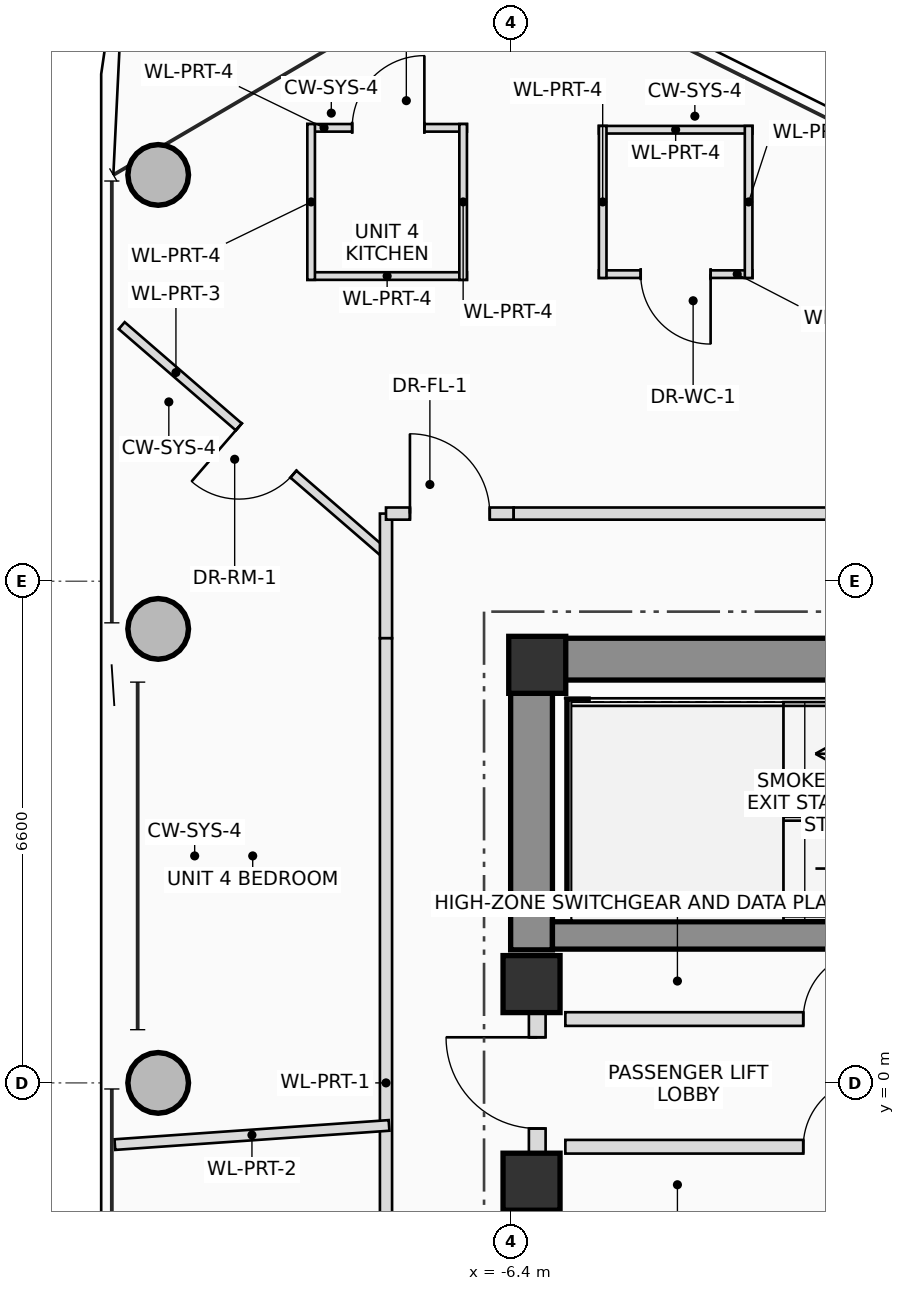
"""IFC4 building model, lengths in metres.
Left out: names, types, materials, properties, quantities, classifications, styles, units other than length and angle.
Written with IfcOpenShell. Run it as: python <this file> out.ifc"""

import sys

from ifc_helpers import new_model, si_unit, direction, frame, frame_2d, origin, origin_2d, place, context, subcontext, project, spatial, rectangle, hollow_circle, extrude, source, transform, mapped, element, fill, save


model = new_model("IFC4")
c1 = context("Model", 3, precision=1e-05, world=origin(), true_north=direction((0.0, 1.0)))
c2 = subcontext(c1, "Body", "Model", "MODEL_VIEW")
j1 = project(units=[si_unit("LENGTHUNIT", "METRE"), si_unit("PLANEANGLEUNIT", "RADIAN")], contexts=[c1])
p1 = place(None, origin())
s1 = spatial("IfcSite", under=j1, at=p1, CompositionType="ELEMENT")
p2 = place(p1, origin())
s2 = spatial("IfcBuilding", under=s1, at=p2, CompositionType="ELEMENT")
p3 = place(p2, frame((0.0, 0.0, 303.65)))
s3 = spatial("IfcBuildingStorey", under=s2, at=p3, CompositionType="ELEMENT", Elevation=303.65)
m1 = source(origin(), c2, "Body", "SweptSolid", [
    extrude(rectangle(XDim=0.75, YDim=0.75, at=origin_2d()), origin(), (0.0, 0.0, 1.0), 3.45),
])
p4 = place(p3, frame((-6.05, 5.5, 0.0), z_axis=(0.0, 0.0, 1.0), x_axis=(1.0, 0.0, 0.0)))
e1 = element("IfcColumn", 1, at=p4, inside=s3, PredefinedType="COLUMN", context=c2, shape_type="MappedRepresentation", body=[
    mapped(m1, transform((0.0, 0.0, 0.0), scale=1.0)),
])
p5 = place(p3, frame((-6.4, 5.575, 0.0), z_axis=(0.0, 0.0, 1.0), x_axis=(1.0, 0.0, 0.0)))
e2 = element("IfcWall", 2, at=p5, inside=s3, PredefinedType="SHEAR", context=c2, shape_type="SweptSolid", body=[
    extrude(rectangle(XDim=12.8, YDim=0.55, at=frame_2d((6.4, 0.0))), origin(), (0.0, 0.0, 1.0), 3.45),
])
p6 = place(p5, frame((8.6, 0.0, 0.0)))
e3 = element("IfcOpeningElement", 3, at=p6, cuts=e2, PredefinedType="OPENING", context=c2, shape_type="SweptSolid", body=[
    extrude(rectangle(XDim=1.2, YDim=2.2, at=frame_2d((0.6, 1.1))), frame((0.0, 0.285, 0.0), z_axis=(0.0, -1.0, 0.0), x_axis=(1.0, 0.0, 0.0)), (0.0, 0.0, 1.0), 0.57),
])
p7 = place(p3, frame((-6.125, 1.75, 0.0), z_axis=(0.0, 0.0, 1.0), x_axis=(0.0, 1.0, 0.0)))
e4 = element("IfcWall", 4, at=p7, inside=s3, PredefinedType="SHEAR", context=c2, shape_type="SweptSolid", body=[
    extrude(rectangle(XDim=3.55, YDim=0.55, at=frame_2d((1.775, 0.0))), origin(), (0.0, 0.0, 1.0), 3.45),
])
p8 = place(p3, frame((-5.85, 1.94, 0.0), z_axis=(0.0, 0.0, 1.0), x_axis=(1.0, 0.0, 0.0)))
e5 = element("IfcWall", 5, at=p8, inside=s3, PredefinedType="SHEAR", context=c2, shape_type="SweptSolid", body=[
    extrude(rectangle(XDim=11.7, YDim=0.36, at=frame_2d((5.85, 0.0))), origin(), (0.0, 0.0, 1.0), 3.45),
])
p9 = place(p3, frame((-5.52, 2.3, 0.0), z_axis=(0.0, 0.0, 1.0), x_axis=(0.0, 1.0, 0.0)))
e6 = element("IfcWall", 6, at=p9, inside=s3, PredefinedType="SHEAR", context=c2, shape_type="SweptSolid", body=[
    extrude(rectangle(XDim=2.75, YDim=0.28, at=frame_2d((1.375, 0.0))), origin(), (0.0, 0.0, 1.0), 3.45),
])
for number, where, z_axis, x_axis in (
    (7, (-6.125, -1.3, 0.0), (0.0, 0.0, 1.0), (1.0, 0.0, 0.0)),
    (8, (-6.125, 1.3, 0.0), (0.0, 0.0, 1.0), (1.0, 0.0, 0.0)),
):
    element("IfcColumn", number, at=place(p3, frame(where, z_axis=z_axis, x_axis=x_axis)), inside=s3, PredefinedType="COLUMN", context=c2, shape_type="MappedRepresentation", body=[
        mapped(m1, transform((0.0, 0.0, 0.0), scale=1.0)),
    ])
m2 = source(origin(), c2, "Body", "SweptSolid", [
    extrude(hollow_circle(Radius=0.4, WallThickness=0.028, at=origin_2d()), origin(), (0.0, 0.0, 1.0), 3.45),
])
for number, where, z_axis, x_axis in (
    (9, (-11.037, 11.945, 0.0), (0.0, 0.0, 1.0), (1.0, 0.0, 0.0)),
    (10, (-11.037, 5.973, 0.0), (0.0, 0.0, 1.0), (1.0, 0.0, 0.0)),
    (11, (-11.037, 0.0, 0.0), (0.0, 0.0, 1.0), (1.0, 0.0, 0.0)),
):
    element("IfcColumn", number, at=place(p3, frame(where, z_axis=z_axis, x_axis=x_axis)), inside=s3, PredefinedType="COLUMN", context=c2, shape_type="MappedRepresentation", body=[
        mapped(m2, transform((0.0, 0.0, 0.0), scale=1.0)),
    ])
p10 = place(p3, frame((-6.05, -0.95, 0.0), z_axis=(0.0, 0.0, 1.0), x_axis=(0.0, 1.0, 0.0)))
e12 = element("IfcWall", 12, at=p10, inside=s3, PredefinedType="PLUMBINGWALL", context=c2, shape_type="SweptSolid", body=[
    extrude(rectangle(XDim=1.9, YDim=0.22, at=frame_2d((0.95, 0.0))), origin(), (0.0, 0.0, 1.0), 2.23),
])
p11 = place(p10, frame((0.35, 0.0, 0.0)))
e13 = element("IfcOpeningElement", 13, at=p11, cuts=e12, PredefinedType="OPENING", context=c2, shape_type="SweptSolid", body=[
    extrude(rectangle(XDim=1.2, YDim=2.2, at=frame_2d((0.6, 1.1))), frame((0.0, 0.12, 0.0), z_axis=(0.0, -1.0, 0.0), x_axis=(1.0, 0.0, 0.0)), (0.0, 0.0, 1.0), 0.24),
])
p12 = place(p3, frame((-5.68, 0.84, 0.0), z_axis=(0.0, 0.0, 1.0), x_axis=(1.0, 0.0, 0.0)))
e14 = element("IfcWall", 14, at=p12, inside=s3, PredefinedType="PLUMBINGWALL", context=c2, shape_type="SweptSolid", body=[
    extrude(rectangle(XDim=11.33, YDim=0.18, at=frame_2d((5.665, 0.0))), origin(), (0.0, 0.0, 1.0), 3.25),
])
p13 = place(p12, frame((3.13, 0.0, 0.0)))
e15 = element("IfcOpeningElement", 15, at=p13, cuts=e14, PredefinedType="OPENING", context=c2, shape_type="SweptSolid", body=[
    extrude(rectangle(XDim=0.9, YDim=2.05, at=frame_2d((0.45, 1.025))), frame((0.0, 0.1, 0.0), z_axis=(0.0, -1.0, 0.0), x_axis=(1.0, 0.0, 0.0)), (0.0, 0.0, 1.0), 0.2),
])
p14 = place(p12, frame((7.33, 0.0, 0.0)))
e16 = element("IfcOpeningElement", 16, at=p14, cuts=e14, PredefinedType="OPENING", context=c2, shape_type="SweptSolid", body=[
    extrude(rectangle(XDim=1.1, YDim=2.2, at=frame_2d((0.55, 1.1))), frame((0.0, 0.1, 0.0), z_axis=(0.0, -1.0, 0.0), x_axis=(1.0, 0.0, 0.0)), (0.0, 0.0, 1.0), 0.2),
])
p15 = place(p12, frame((8.83, 0.0, 0.0)))
e17 = element("IfcOpeningElement", 17, at=p15, cuts=e14, PredefinedType="OPENING", context=c2, shape_type="SweptSolid", body=[
    extrude(rectangle(XDim=1.1, YDim=2.2, at=frame_2d((0.55, 1.1))), frame((0.0, 0.1, 0.0), z_axis=(0.0, -1.0, 0.0), x_axis=(1.0, 0.0, 0.0)), (0.0, 0.0, 1.0), 0.2),
])
p16 = place(p12, frame((10.25, 0.0, 0.0)))
e18 = element("IfcOpeningElement", 18, at=p16, cuts=e14, PredefinedType="OPENING", context=c2, shape_type="SweptSolid", body=[
    extrude(rectangle(XDim=0.9, YDim=2.05, at=frame_2d((0.45, 1.025))), frame((0.0, 0.1, 0.0), z_axis=(0.0, -1.0, 0.0), x_axis=(1.0, 0.0, 0.0)), (0.0, 0.0, 1.0), 0.2),
])
p17 = place(p3, frame((-5.68, -0.84, 0.0), z_axis=(0.0, 0.0, 1.0), x_axis=(1.0, 0.0, 0.0)))
e19 = element("IfcWall", 19, at=p17, inside=s3, PredefinedType="PLUMBINGWALL", context=c2, shape_type="SweptSolid", body=[
    extrude(rectangle(XDim=11.33, YDim=0.18, at=frame_2d((5.665, 0.0))), origin(), (0.0, 0.0, 1.0), 3.25),
])
p18 = place(p17, frame((3.13, 0.0, 0.0)))
e20 = element("IfcOpeningElement", 20, at=p18, cuts=e19, PredefinedType="OPENING", context=c2, shape_type="SweptSolid", body=[
    extrude(rectangle(XDim=0.9, YDim=2.05, at=frame_2d((0.45, 1.025))), frame((0.0, 0.1, 0.0), z_axis=(0.0, -1.0, 0.0), x_axis=(1.0, 0.0, 0.0)), (0.0, 0.0, 1.0), 0.2),
])
p19 = place(p17, frame((7.33, 0.0, 0.0)))
e21 = element("IfcOpeningElement", 21, at=p19, cuts=e19, PredefinedType="OPENING", context=c2, shape_type="SweptSolid", body=[
    extrude(rectangle(XDim=1.1, YDim=2.2, at=frame_2d((0.55, 1.1))), frame((0.0, 0.1, 0.0), z_axis=(0.0, -1.0, 0.0), x_axis=(1.0, 0.0, 0.0)), (0.0, 0.0, 1.0), 0.2),
])
p20 = place(p17, frame((9.58, 0.0, 0.0)))
e22 = element("IfcOpeningElement", 22, at=p20, cuts=e19, PredefinedType="OPENING", context=c2, shape_type="SweptSolid", body=[
    extrude(rectangle(XDim=0.9, YDim=2.05, at=frame_2d((0.45, 1.025))), frame((0.0, 0.1, 0.0), z_axis=(0.0, -1.0, 0.0), x_axis=(1.0, 0.0, 0.0)), (0.0, 0.0, 1.0), 0.2),
])
p21 = place(p3, frame((-8.07, 6.981, 0.0), z_axis=(0.0, 0.0, 1.0), x_axis=(-0.756280799409, 0.654247164644, 0.0)))
e23 = element("IfcWall", 23, at=p21, inside=s3, PredefinedType="PARTITIONING", context=c2, shape_type="SweptSolid", body=[
    extrude(rectangle(XDim=4.558, YDim=0.12, at=frame_2d((2.279, 0.0))), origin(), (0.0, 0.0, 1.0), 2.815),
])
p22 = place(p21, frame((1.571, 0.0, 0.0)))
e24 = element("IfcOpeningElement", 24, at=p22, cuts=e23, PredefinedType="OPENING", context=c2, shape_type="SweptSolid", body=[
    extrude(rectangle(XDim=0.95, YDim=2.1, at=frame_2d((0.475, 1.05))), frame((0.0, 0.07, 0.0), z_axis=(0.0, -1.0, 0.0), x_axis=(1.0, 0.0, 0.0)), (0.0, 0.0, 1.0), 0.14),
])
p23 = place(p3, frame((-5.239, 12.54, 0.0), z_axis=(0.0, 0.0, 1.0), x_axis=(1.0, 0.0, 0.0)))
e25 = element("IfcWall", 25, at=p23, inside=s3, PredefinedType="PARTITIONING", context=c2, shape_type="SweptSolid", body=[
    extrude(rectangle(XDim=2.02, YDim=0.1, at=frame_2d((1.01, 0.0))), origin(), (0.0, 0.0, 1.0), 2.815),
])
p24 = place(p3, frame((-3.219, 10.64, 0.0), z_axis=(0.0, 0.0, 1.0), x_axis=(-1.0, 0.0, 0.0)))
e26 = element("IfcWall", 26, at=p24, inside=s3, PredefinedType="PARTITIONING", context=c2, shape_type="SweptSolid", body=[
    extrude(rectangle(XDim=2.02, YDim=0.1, at=frame_2d((1.01, 0.0))), origin(), (0.0, 0.0, 1.0), 2.905),
])
p25 = place(p24, frame((0.55, 0.0, 0.0)))
e27 = element("IfcOpeningElement", 27, at=p25, cuts=e26, PredefinedType="OPENING", context=c2, shape_type="SweptSolid", body=[
    extrude(rectangle(XDim=0.92, YDim=2.1, at=frame_2d((0.46, 1.05))), frame((0.0, 0.06, 0.0), z_axis=(0.0, -1.0, 0.0), x_axis=(1.0, 0.0, 0.0)), (0.0, 0.0, 1.0), 0.12),
])
p26 = place(p3, frame((-3.269, 12.59, 0.0), z_axis=(0.0, 0.0, 1.0), x_axis=(0.0, -1.0, 0.0)))
e28 = element("IfcWall", 28, at=p26, inside=s3, PredefinedType="PARTITIONING", context=c2, shape_type="SweptSolid", body=[
    extrude(rectangle(XDim=2.0, YDim=0.1, at=frame_2d((1.0, 0.0))), origin(), (0.0, 0.0, 1.0), 2.815),
])
p27 = place(p3, frame((-5.189, 10.59, 0.0), z_axis=(0.0, 0.0, 1.0), x_axis=(0.0, 1.0, 0.0)))
e29 = element("IfcWall", 29, at=p27, inside=s3, PredefinedType="PARTITIONING", context=c2, shape_type="SweptSolid", body=[
    extrude(rectangle(XDim=2.0, YDim=0.1, at=frame_2d((1.0, 0.0))), origin(), (0.0, 0.0, 1.0), 2.905),
])
p28 = place(p3, frame((-9.075, 12.565, 0.0), z_axis=(0.0, 0.0, 1.0), x_axis=(1.0, 0.0, 0.0)))
e30 = element("IfcWall", 30, at=p28, inside=s3, PredefinedType="PARTITIONING", context=c2, shape_type="SweptSolid", body=[
    extrude(rectangle(XDim=2.1, YDim=0.1, at=frame_2d((1.05, 0.0))), origin(), (0.0, 0.0, 1.0), 3.25),
])
p29 = place(p28, frame((0.59, 0.0, 0.0)))
e31 = element("IfcOpeningElement", 31, at=p29, cuts=e30, PredefinedType="OPENING", context=c2, shape_type="SweptSolid", body=[
    extrude(rectangle(XDim=0.95, YDim=2.1, at=frame_2d((0.475, 1.05))), frame((0.0, 0.06, 0.0), z_axis=(0.0, -1.0, 0.0), x_axis=(1.0, 0.0, 0.0)), (0.0, 0.0, 1.0), 0.12),
])
p30 = place(p3, frame((-6.975, 10.615, 0.0), z_axis=(0.0, 0.0, 1.0), x_axis=(-1.0, 0.0, 0.0)))
e32 = element("IfcWall", 32, at=p30, inside=s3, PredefinedType="PARTITIONING", context=c2, shape_type="SweptSolid", body=[
    extrude(rectangle(XDim=2.1, YDim=0.1, at=frame_2d((1.05, 0.0))), origin(), (0.0, 0.0, 1.0), 2.905),
])
p31 = place(p3, frame((-7.025, 12.615, 0.0), z_axis=(0.0, 0.0, 1.0), x_axis=(0.0, -1.0, 0.0)))
e33 = element("IfcWall", 33, at=p31, inside=s3, PredefinedType="PARTITIONING", context=c2, shape_type="SweptSolid", body=[
    extrude(rectangle(XDim=2.05, YDim=0.1, at=frame_2d((1.025, 0.0))), origin(), (0.0, 0.0, 1.0), 2.905),
])
p32 = place(p3, frame((-9.025, 10.565, 0.0), z_axis=(0.0, 0.0, 1.0), x_axis=(0.0, 1.0, 0.0)))
e34 = element("IfcWall", 34, at=p32, inside=s3, PredefinedType="PARTITIONING", context=c2, shape_type="SweptSolid", body=[
    extrude(rectangle(XDim=2.05, YDim=0.1, at=frame_2d((1.025, 0.0))), origin(), (0.0, 0.0, 1.0), 3.25),
])
p33 = place(p3, frame((-8.04, 5.85, 0.0), z_axis=(0.0, 0.0, 1.0), x_axis=(0.0, 1.0, 0.0)))
e35 = element("IfcWall", 35, at=p33, inside=s3, PredefinedType="PARTITIONING", context=c2, shape_type="SweptSolid", body=[
    extrude(rectangle(XDim=1.64, YDim=0.16, at=frame_2d((0.82, 0.0))), origin(), (0.0, 0.0, 1.0), 2.905),
])
p34 = place(p3, frame((-8.04, 7.49, 0.0), z_axis=(0.0, 0.0, 1.0), x_axis=(1.0, 0.0, 0.0)))
e36 = element("IfcWall", 36, at=p34, inside=s3, PredefinedType="PARTITIONING", context=c2, shape_type="SweptSolid", body=[
    extrude(rectangle(XDim=1.68, YDim=0.16, at=frame_2d((0.84, 0.0))), origin(), (0.0, 0.0, 1.0), 2.655),
])
p35 = place(p34, frame((0.315, 0.0, 0.0)))
e37 = element("IfcOpeningElement", 37, at=p35, cuts=e36, PredefinedType="OPENING", context=c2, shape_type="SweptSolid", body=[
    extrude(rectangle(XDim=1.05, YDim=2.2, at=frame_2d((0.525, 1.1))), frame((0.0, 0.09, 0.0), z_axis=(0.0, -1.0, 0.0), x_axis=(1.0, 0.0, 0.0)), (0.0, 0.0, 1.0), 0.18),
])
p36 = place(p3, frame((-6.36, 7.49, 0.0), z_axis=(0.0, 0.0, 1.0), x_axis=(1.0, 0.0, 0.0)))
e38 = element("IfcWall", 38, at=p36, inside=s3, PredefinedType="PARTITIONING", context=c2, shape_type="SweptSolid", body=[
    extrude(rectangle(XDim=9.679, YDim=0.16, at=frame_2d((4.84, 0.0))), origin(), (0.0, 0.0, 1.0), 2.655),
])
p37 = place(p3, frame((-8.04, -5.85, 0.0), z_axis=(0.0, 0.0, 1.0), x_axis=(0.0, 1.0, 0.0)))
e39 = element("IfcWall", 39, at=p37, inside=s3, PredefinedType="PARTITIONING", context=c2, shape_type="SweptSolid", body=[
    extrude(rectangle(XDim=11.7, YDim=0.16, at=frame_2d((5.85, 0.0))), origin(), (0.0, 0.0, 1.0), 2.655),
])
p38 = place(p3, frame((-8.0, -0.559, 0.0), z_axis=(0.0, 0.0, 1.0), x_axis=(-0.99756047181, -0.069807629118, 0.0)))
e40 = element("IfcWall", 40, at=p38, inside=s3, PredefinedType="PARTITIONING", context=c2, shape_type="SweptSolid", body=[
    extrude(rectangle(XDim=3.616, YDim=0.14, at=frame_2d((1.808, 0.0))), origin(), (0.0, 0.0, 1.0), 2.655),
])
p39 = place(p11, origin())
e41 = element("IfcDoor", 41, at=p39, inside=s3, OperationType="SINGLE_SWING_RIGHT", PredefinedType="DOOR", context=c2, shape_type="SweptSolid", body=[
    extrude(rectangle(XDim=1.2, YDim=2.2, at=frame_2d((0.6, 1.1))), frame((0.0, 0.025, 0.0), z_axis=(0.0, -1.0, 0.0), x_axis=(1.0, 0.0, 0.0)), (0.0, 0.0, 1.0), 0.05),
])
fill(e13, e41)
p40 = place(p13, origin())
e42 = element("IfcDoor", 42, at=p40, inside=s3, OperationType="SINGLE_SWING_RIGHT", PredefinedType="DOOR", context=c2, shape_type="SweptSolid", body=[
    extrude(rectangle(XDim=0.9, YDim=2.05, at=frame_2d((0.45, 1.025))), frame((0.0, 0.025, 0.0), z_axis=(0.0, -1.0, 0.0), x_axis=(1.0, 0.0, 0.0)), (0.0, 0.0, 1.0), 0.05),
])
fill(e15, e42)
p41 = place(p18, origin())
e43 = element("IfcDoor", 43, at=p41, inside=s3, OperationType="SINGLE_SWING_RIGHT", PredefinedType="DOOR", context=c2, shape_type="SweptSolid", body=[
    extrude(rectangle(XDim=0.9, YDim=2.05, at=frame_2d((0.45, 1.025))), frame((0.0, 0.025, 0.0), z_axis=(0.0, -1.0, 0.0), x_axis=(1.0, 0.0, 0.0)), (0.0, 0.0, 1.0), 0.05),
])
fill(e20, e43)
p42 = place(p22, origin())
e44 = element("IfcDoor", 44, at=p42, inside=s3, OperationType="SINGLE_SWING_RIGHT", PredefinedType="DOOR", context=c2, shape_type="SweptSolid", body=[
    extrude(rectangle(XDim=0.95, YDim=2.1, at=frame_2d((0.475, 1.05))), frame((0.0, 0.025, 0.0), z_axis=(0.0, -1.0, 0.0), x_axis=(1.0, 0.0, 0.0)), (0.0, 0.0, 1.0), 0.05),
])
fill(e24, e44)
p43 = place(p25, origin())
e45 = element("IfcDoor", 45, at=p43, inside=s3, OperationType="SINGLE_SWING_LEFT", PredefinedType="DOOR", context=c2, shape_type="SweptSolid", body=[
    extrude(rectangle(XDim=0.92, YDim=2.1, at=frame_2d((0.46, 1.05))), frame((0.0, 0.025, 0.0), z_axis=(0.0, -1.0, 0.0), x_axis=(1.0, 0.0, 0.0)), (0.0, 0.0, 1.0), 0.05),
])
fill(e27, e45)
p44 = place(p29, origin())
e46 = element("IfcDoor", 46, at=p44, inside=s3, OperationType="SINGLE_SWING_RIGHT", PredefinedType="DOOR", context=c2, shape_type="SweptSolid", body=[
    extrude(rectangle(XDim=0.95, YDim=2.1, at=frame_2d((0.475, 1.05))), frame((0.0, 0.025, 0.0), z_axis=(0.0, -1.0, 0.0), x_axis=(1.0, 0.0, 0.0)), (0.0, 0.0, 1.0), 0.05),
])
fill(e31, e46)
p45 = place(p35, origin())
e47 = element("IfcDoor", 47, at=p45, inside=s3, OperationType="SINGLE_SWING_LEFT", PredefinedType="DOOR", context=c2, shape_type="SweptSolid", body=[
    extrude(rectangle(XDim=1.05, YDim=2.2, at=frame_2d((0.525, 1.1))), frame((0.0, 0.025, 0.0), z_axis=(0.0, -1.0, 0.0), x_axis=(1.0, 0.0, 0.0)), (0.0, 0.0, 1.0), 0.05),
])
fill(e37, e47)
save(model, sys.argv[1])
